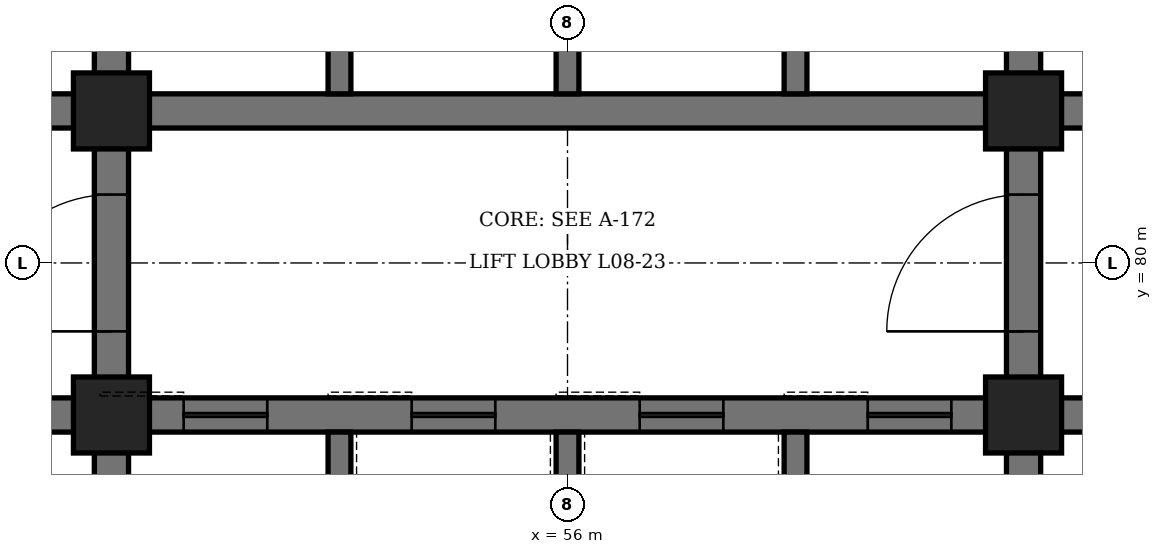
"""IFC4 building model, lengths in metres.
Left out: names, types, materials, properties, quantities, classifications, styles, units other than length and angle.
Written with IfcOpenShell. Run it as: python <this file> out.ifc"""

import sys

from ifc_helpers import new_model, si_unit, direction, frame, frame_2d, origin, origin_2d, place, context, subcontext, project, spatial, rectangle, hollow_rectangle, extrude, element, fill, save


model = new_model("IFC4")
c1 = context("Model", 3, precision=1e-05, world=origin(), true_north=direction((0.0, 1.0)))
c2 = subcontext(c1, "Body", "Model", "MODEL_VIEW")
j1 = project(units=[si_unit("LENGTHUNIT", "METRE"), si_unit("PLANEANGLEUNIT", "RADIAN")], contexts=[c1])
p1 = place(None, origin())
s1 = spatial("IfcSite", under=j1, at=p1, CompositionType="ELEMENT")
p2 = place(p1, origin())
s2 = spatial("IfcBuilding", under=s1, at=p2, CompositionType="ELEMENT")
p3 = place(p2, frame((0.0, 0.0, 43.3)))
s3 = spatial("IfcBuildingStorey", under=s2, at=p3, CompositionType="ELEMENT", Elevation=43.3)
p4 = place(p3, frame((50.0, 71.6, 0.0), z_axis=(0.0, 0.0, 1.0), x_axis=(0.0, 1.0, 0.0)))
e1 = element("IfcWall", 1, at=p4, inside=s3, PredefinedType="SHEAR", context=c2, shape_type="SweptSolid", body=[
    extrude(rectangle(XDim=16.8, YDim=0.45, at=frame_2d((8.4, 0.0))), origin(), (0.0, 0.0, 1.0), 4.2),
])
p5 = place(p4, frame((7.5, 0.0, 0.0)))
e2 = element("IfcOpeningElement", 2, at=p5, cuts=e1, PredefinedType="OPENING", context=c2, shape_type="SweptSolid", body=[
    extrude(rectangle(XDim=1.8, YDim=2.4, at=frame_2d((0.9, 1.2))), frame((0.0, 0.235, 0.0), z_axis=(0.0, -1.0, 0.0), x_axis=(1.0, 0.0, 0.0)), (0.0, 0.0, 1.0), 0.47),
])
p6 = place(p3, frame((62.0, 71.6, 0.0), z_axis=(0.0, 0.0, 1.0), x_axis=(0.0, 1.0, 0.0)))
e3 = element("IfcWall", 3, at=p6, inside=s3, PredefinedType="SHEAR", context=c2, shape_type="SweptSolid", body=[
    extrude(rectangle(XDim=16.8, YDim=0.45, at=frame_2d((8.4, 0.0))), origin(), (0.0, 0.0, 1.0), 4.2),
])
p7 = place(p6, frame((7.5, 0.0, 0.0)))
e4 = element("IfcOpeningElement", 4, at=p7, cuts=e3, PredefinedType="OPENING", context=c2, shape_type="SweptSolid", body=[
    extrude(rectangle(XDim=1.8, YDim=2.4, at=frame_2d((0.9, 1.2))), frame((0.0, 0.235, 0.0), z_axis=(0.0, -1.0, 0.0), x_axis=(1.0, 0.0, 0.0)), (0.0, 0.0, 1.0), 0.47),
])
p8 = place(p3, frame((44.6, 78.0, 0.0), z_axis=(0.0, 0.0, 1.0), x_axis=(1.0, 0.0, 0.0)))
e5 = element("IfcWall", 5, at=p8, inside=s3, PredefinedType="SHEAR", context=c2, shape_type="SweptSolid", body=[
    extrude(rectangle(XDim=5.175, YDim=0.45, at=frame_2d((2.587, 0.0))), origin(), (0.0, 0.0, 1.0), 4.2),
])
p9 = place(p8, frame((1.8, 0.0, 0.0)))
e6 = element("IfcOpeningElement", 6, at=p9, cuts=e5, PredefinedType="OPENING", context=c2, shape_type="SweptSolid", body=[
    extrude(rectangle(XDim=1.2, YDim=2.1, at=frame_2d((0.6, 1.05))), frame((0.0, 0.235, 0.0), z_axis=(0.0, -1.0, 0.0), x_axis=(1.0, 0.0, 0.0)), (0.0, 0.0, 1.0), 0.47),
])
p10 = place(p3, frame((44.6, 82.0, 0.0), z_axis=(0.0, 0.0, 1.0), x_axis=(1.0, 0.0, 0.0)))
e7 = element("IfcWall", 7, at=p10, inside=s3, PredefinedType="SHEAR", context=c2, shape_type="SweptSolid", body=[
    extrude(rectangle(XDim=5.175, YDim=0.45, at=frame_2d((2.587, 0.0))), origin(), (0.0, 0.0, 1.0), 4.2),
])
p11 = place(p10, frame((0.7, 0.0, 0.0)))
e8 = element("IfcOpeningElement", 8, at=p11, cuts=e7, PredefinedType="OPENING", context=c2, shape_type="SweptSolid", body=[
    extrude(rectangle(XDim=0.9, YDim=2.1, at=frame_2d((0.45, 1.05))), frame((0.0, 0.235, 0.0), z_axis=(0.0, -1.0, 0.0), x_axis=(1.0, 0.0, 0.0)), (0.0, 0.0, 1.0), 0.47),
])
p12 = place(p3, frame((62.225, 78.0, 0.0), z_axis=(0.0, 0.0, 1.0), x_axis=(1.0, 0.0, 0.0)))
e9 = element("IfcWall", 9, at=p12, inside=s3, PredefinedType="SHEAR", context=c2, shape_type="SweptSolid", body=[
    extrude(rectangle(XDim=5.175, YDim=0.45, at=frame_2d((2.587, 0.0))), origin(), (0.0, 0.0, 1.0), 4.2),
])
p13 = place(p12, frame((2.175, 0.0, 0.0)))
e10 = element("IfcOpeningElement", 10, at=p13, cuts=e9, PredefinedType="OPENING", context=c2, shape_type="SweptSolid", body=[
    extrude(rectangle(XDim=1.2, YDim=2.1, at=frame_2d((0.6, 1.05))), frame((0.0, 0.235, 0.0), z_axis=(0.0, -1.0, 0.0), x_axis=(1.0, 0.0, 0.0)), (0.0, 0.0, 1.0), 0.47),
])
p14 = place(p3, frame((62.225, 82.0, 0.0), z_axis=(0.0, 0.0, 1.0), x_axis=(1.0, 0.0, 0.0)))
e11 = element("IfcWall", 11, at=p14, inside=s3, PredefinedType="SHEAR", context=c2, shape_type="SweptSolid", body=[
    extrude(rectangle(XDim=5.175, YDim=0.45, at=frame_2d((2.587, 0.0))), origin(), (0.0, 0.0, 1.0), 4.2),
])
p15 = place(p14, frame((2.175, 0.0, 0.0)))
e12 = element("IfcOpeningElement", 12, at=p15, cuts=e11, PredefinedType="OPENING", context=c2, shape_type="SweptSolid", body=[
    extrude(rectangle(XDim=1.2, YDim=2.1, at=frame_2d((0.6, 1.05))), frame((0.0, 0.235, 0.0), z_axis=(0.0, -1.0, 0.0), x_axis=(1.0, 0.0, 0.0)), (0.0, 0.0, 1.0), 0.47),
])
p16 = place(p3, frame((50.225, 78.0, 0.0), z_axis=(0.0, 0.0, 1.0), x_axis=(1.0, 0.0, 0.0)))
e13 = element("IfcWall", 13, at=p16, inside=s3, PredefinedType="SHEAR", context=c2, shape_type="SweptSolid", body=[
    extrude(rectangle(XDim=11.55, YDim=0.45, at=frame_2d((5.775, 0.0))), origin(), (0.0, 0.0, 1.0), 4.2),
])
p17 = place(p16, frame((0.725, 0.0, 0.0)))
e14 = element("IfcOpeningElement", 14, at=p17, cuts=e13, PredefinedType="OPENING", context=c2, shape_type="SweptSolid", body=[
    extrude(rectangle(XDim=1.1, YDim=2.2, at=frame_2d((0.55, 1.1))), frame((0.0, 0.235, 0.0), z_axis=(0.0, -1.0, 0.0), x_axis=(1.0, 0.0, 0.0)), (0.0, 0.0, 1.0), 0.47),
])
p18 = place(p16, frame((3.725, 0.0, 0.0)))
e15 = element("IfcOpeningElement", 15, at=p18, cuts=e13, PredefinedType="OPENING", context=c2, shape_type="SweptSolid", body=[
    extrude(rectangle(XDim=1.1, YDim=2.2, at=frame_2d((0.55, 1.1))), frame((0.0, 0.235, 0.0), z_axis=(0.0, -1.0, 0.0), x_axis=(1.0, 0.0, 0.0)), (0.0, 0.0, 1.0), 0.47),
])
p19 = place(p16, frame((6.725, 0.0, 0.0)))
e16 = element("IfcOpeningElement", 16, at=p19, cuts=e13, PredefinedType="OPENING", context=c2, shape_type="SweptSolid", body=[
    extrude(rectangle(XDim=1.1, YDim=2.2, at=frame_2d((0.55, 1.1))), frame((0.0, 0.235, 0.0), z_axis=(0.0, -1.0, 0.0), x_axis=(1.0, 0.0, 0.0)), (0.0, 0.0, 1.0), 0.47),
])
p20 = place(p16, frame((9.725, 0.0, 0.0)))
e17 = element("IfcOpeningElement", 17, at=p20, cuts=e13, PredefinedType="OPENING", context=c2, shape_type="SweptSolid", body=[
    extrude(rectangle(XDim=1.1, YDim=2.2, at=frame_2d((0.55, 1.1))), frame((0.0, 0.235, 0.0), z_axis=(0.0, -1.0, 0.0), x_axis=(1.0, 0.0, 0.0)), (0.0, 0.0, 1.0), 0.47),
])
p21 = place(p3, frame((50.225, 82.0, 0.0), z_axis=(0.0, 0.0, 1.0), x_axis=(1.0, 0.0, 0.0)))
e18 = element("IfcWall", 18, at=p21, inside=s3, PredefinedType="SHEAR", context=c2, shape_type="SweptSolid", body=[
    extrude(rectangle(XDim=11.55, YDim=0.45, at=frame_2d((5.775, 0.0))), origin(), (0.0, 0.0, 1.0), 4.2),
])
p22 = place(p3, frame((53.0, 74.15, 0.0), z_axis=(0.0, 0.0, 1.0), x_axis=(0.0, 1.0, 0.0)))
e19 = element("IfcWall", 19, at=p22, inside=s3, PredefinedType="SHEAR", context=c2, shape_type="SweptSolid", body=[
    extrude(rectangle(XDim=3.625, YDim=0.3, at=frame_2d((1.812, 0.0))), origin(), (0.0, 0.0, 1.0), 4.2),
])
p23 = place(p3, frame((53.0, 82.225, 0.0), z_axis=(0.0, 0.0, 1.0), x_axis=(0.0, 1.0, 0.0)))
e20 = element("IfcWall", 20, at=p23, inside=s3, PredefinedType="SHEAR", context=c2, shape_type="SweptSolid", body=[
    extrude(rectangle(XDim=3.55, YDim=0.3, at=frame_2d((1.775, 0.0))), origin(), (0.0, 0.0, 1.0), 4.2),
])
p24 = place(p3, frame((56.0, 74.15, 0.0), z_axis=(0.0, 0.0, 1.0), x_axis=(0.0, 1.0, 0.0)))
e21 = element("IfcWall", 21, at=p24, inside=s3, PredefinedType="SHEAR", context=c2, shape_type="SweptSolid", body=[
    extrude(rectangle(XDim=3.625, YDim=0.3, at=frame_2d((1.812, 0.0))), origin(), (0.0, 0.0, 1.0), 4.2),
])
p25 = place(p3, frame((56.0, 82.225, 0.0), z_axis=(0.0, 0.0, 1.0), x_axis=(0.0, 1.0, 0.0)))
e22 = element("IfcWall", 22, at=p25, inside=s3, PredefinedType="SHEAR", context=c2, shape_type="SweptSolid", body=[
    extrude(rectangle(XDim=3.55, YDim=0.3, at=frame_2d((1.775, 0.0))), origin(), (0.0, 0.0, 1.0), 4.2),
])
p26 = place(p3, frame((59.0, 74.15, 0.0), z_axis=(0.0, 0.0, 1.0), x_axis=(0.0, 1.0, 0.0)))
e23 = element("IfcWall", 23, at=p26, inside=s3, PredefinedType="SHEAR", context=c2, shape_type="SweptSolid", body=[
    extrude(rectangle(XDim=3.625, YDim=0.3, at=frame_2d((1.812, 0.0))), origin(), (0.0, 0.0, 1.0), 4.2),
])
p27 = place(p3, frame((59.0, 82.225, 0.0), z_axis=(0.0, 0.0, 1.0), x_axis=(0.0, 1.0, 0.0)))
e24 = element("IfcWall", 24, at=p27, inside=s3, PredefinedType="SHEAR", context=c2, shape_type="SweptSolid", body=[
    extrude(rectangle(XDim=3.55, YDim=0.3, at=frame_2d((1.775, 0.0))), origin(), (0.0, 0.0, 1.0), 4.2),
])
for number, where, z_axis, x_axis in (
    (25, (50.0, 78.0, 0.0), (0.0, 0.0, 1.0), (1.0, 0.0, 0.0)),
    (26, (50.0, 82.0, 0.0), (0.0, 0.0, 1.0), (1.0, 0.0, 0.0)),
    (27, (62.0, 78.0, 0.0), (0.0, 0.0, 1.0), (1.0, 0.0, 0.0)),
    (28, (62.0, 82.0, 0.0), (0.0, 0.0, 1.0), (1.0, 0.0, 0.0)),
):
    element("IfcColumn", number, at=place(p3, frame(where, z_axis=z_axis, x_axis=x_axis)), inside=s3, PredefinedType="COLUMN", context=c2, shape_type="SweptSolid", body=[
        extrude(hollow_rectangle(XDim=1.0, YDim=1.0, WallThickness=0.15, at=origin_2d()), origin(), (0.0, 0.0, 1.0), 4.2),
    ])
p28 = place(p5, origin())
e29 = element("IfcDoor", 29, at=p28, inside=s3, OperationType="DOUBLE_DOOR_SINGLE_SWING", PredefinedType="DOOR", context=c2, shape_type="SweptSolid", body=[
    extrude(rectangle(XDim=1.8, YDim=2.4, at=frame_2d((0.9, 1.2))), frame((0.0, 0.225, 0.0), z_axis=(0.0, -1.0, 0.0), x_axis=(1.0, 0.0, 0.0)), (0.0, 0.0, 1.0), 0.449),
])
fill(e2, e29)
p29 = place(p7, origin())
e30 = element("IfcDoor", 30, at=p29, inside=s3, OperationType="DOUBLE_DOOR_SINGLE_SWING", PredefinedType="DOOR", context=c2, shape_type="SweptSolid", body=[
    extrude(rectangle(XDim=1.8, YDim=2.4, at=frame_2d((0.9, 1.2))), frame((0.0, 0.225, 0.0), z_axis=(0.0, -1.0, 0.0), x_axis=(1.0, 0.0, 0.0)), (0.0, 0.0, 1.0), 0.449),
])
fill(e4, e30)
p30 = place(p17, origin())
e31 = element("IfcDoor", 31, at=p30, inside=s3, OperationType="SLIDING_TO_LEFT", PredefinedType="DOOR", context=c2, shape_type="SweptSolid", body=[
    extrude(rectangle(XDim=1.1, YDim=2.2, at=frame_2d((0.55, 1.1))), frame((0.0, 0.225, 0.0), z_axis=(0.0, -1.0, 0.0), x_axis=(1.0, 0.0, 0.0)), (0.0, 0.0, 1.0), 0.449),
])
fill(e14, e31)
p31 = place(p18, origin())
e32 = element("IfcDoor", 32, at=p31, inside=s3, OperationType="SLIDING_TO_LEFT", PredefinedType="DOOR", context=c2, shape_type="SweptSolid", body=[
    extrude(rectangle(XDim=1.1, YDim=2.2, at=frame_2d((0.55, 1.1))), frame((0.0, 0.225, 0.0), z_axis=(0.0, -1.0, 0.0), x_axis=(1.0, 0.0, 0.0)), (0.0, 0.0, 1.0), 0.449),
])
fill(e15, e32)
p32 = place(p19, origin())
e33 = element("IfcDoor", 33, at=p32, inside=s3, OperationType="SLIDING_TO_LEFT", PredefinedType="DOOR", context=c2, shape_type="SweptSolid", body=[
    extrude(rectangle(XDim=1.1, YDim=2.2, at=frame_2d((0.55, 1.1))), frame((0.0, 0.225, 0.0), z_axis=(0.0, -1.0, 0.0), x_axis=(1.0, 0.0, 0.0)), (0.0, 0.0, 1.0), 0.449),
])
fill(e16, e33)
p33 = place(p20, origin())
e34 = element("IfcDoor", 34, at=p33, inside=s3, OperationType="SLIDING_TO_LEFT", PredefinedType="DOOR", context=c2, shape_type="SweptSolid", body=[
    extrude(rectangle(XDim=1.1, YDim=2.2, at=frame_2d((0.55, 1.1))), frame((0.0, 0.225, 0.0), z_axis=(0.0, -1.0, 0.0), x_axis=(1.0, 0.0, 0.0)), (0.0, 0.0, 1.0), 0.449),
])
fill(e17, e34)
save(model, sys.argv[1])
